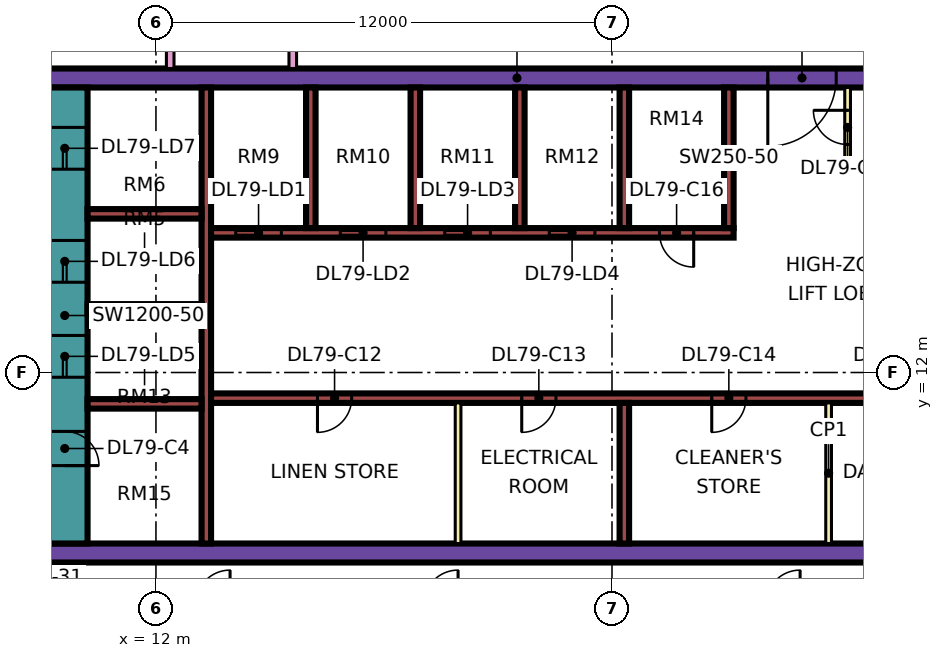
"""IFC4 building model, lengths in metres.
Left out: names, types, materials, properties, quantities, classifications, styles, units other than length and angle.
Written with IfcOpenShell. Run it as: python <this file> out.ifc"""

import sys

from ifc_helpers import new_model, si_unit, direction, frame, frame_2d, origin, place, context, subcontext, project, spatial, rectangle, extrude, element, fill, save


model = new_model("IFC4")
c1 = context("Model", 3, precision=1e-05, world=origin(), true_north=direction((0.0, 1.0)))
c2 = subcontext(c1, "Body", "Model", "MODEL_VIEW")
j1 = project(units=[si_unit("LENGTHUNIT", "METRE"), si_unit("PLANEANGLEUNIT", "RADIAN")], contexts=[c1])
p1 = place(None, origin())
s1 = spatial("IfcSite", under=j1, at=p1, CompositionType="ELEMENT")
p2 = place(p1, origin())
s2 = spatial("IfcBuilding", under=s1, at=p2, CompositionType="ELEMENT")
p3 = place(p2, frame((0.0, 0.0, 342.65)))
s3 = spatial("IfcBuildingStorey", under=s2, at=p3, CompositionType="ELEMENT", Elevation=342.65)
p4 = place(p3, frame((9.0, 7.25, 0.0), z_axis=(0.0, 0.0, 1.0), x_axis=(1.0, 0.0, 0.0)))
e1 = element("IfcWall", 1, at=p4, inside=s3, PredefinedType="SHEAR", context=c2, shape_type="SweptSolid", body=[
    extrude(rectangle(XDim=25.0, YDim=0.5, at=frame_2d((12.5, 0.0))), origin(), (0.0, 0.0, 1.0), 3.75),
])
p5 = place(p3, frame((9.0, 19.75, 0.0), z_axis=(0.0, 0.0, 1.0), x_axis=(1.0, 0.0, 0.0)))
e2 = element("IfcWall", 2, at=p5, inside=s3, PredefinedType="SHEAR", context=c2, shape_type="SweptSolid", body=[
    extrude(rectangle(XDim=25.0, YDim=0.5, at=frame_2d((12.5, 0.0))), origin(), (0.0, 0.0, 1.0), 3.75),
])
p6 = place(p5, frame((19.1, 0.0, 0.0)))
e3 = element("IfcOpeningElement", 3, at=p6, cuts=e2, PredefinedType="OPENING", context=c2, shape_type="SweptSolid", body=[
    extrude(rectangle(XDim=1.8, YDim=2.4, at=frame_2d((0.9, 1.2))), frame((0.0, 0.26, 0.0), z_axis=(0.0, -1.0, 0.0), x_axis=(1.0, 0.0, 0.0)), (0.0, 0.0, 1.0), 0.52),
])
p7 = place(p3, frame((9.6, 7.5, 0.0), z_axis=(0.0, 0.0, 1.0), x_axis=(0.0, 1.0, 0.0)))
e4 = element("IfcWall", 4, at=p7, inside=s3, PredefinedType="SHEAR", context=c2, shape_type="SweptSolid", body=[
    extrude(rectangle(XDim=12.0, YDim=1.2, at=frame_2d((6.0, 0.0))), origin(), (0.0, 0.0, 1.0), 3.75),
])
p8 = place(p7, frame((4.375, 0.0, 0.0)))
e5 = element("IfcOpeningElement", 5, at=p8, cuts=e4, PredefinedType="OPENING", context=c2, shape_type="SweptSolid", body=[
    extrude(rectangle(XDim=1.1, YDim=2.2, at=frame_2d((0.55, 1.1))), frame((0.0, 0.61, 0.0), z_axis=(0.0, -1.0, 0.0), x_axis=(1.0, 0.0, 0.0)), (0.0, 0.0, 1.0), 1.22),
])
p9 = place(p7, frame((6.875, 0.0, 0.0)))
e6 = element("IfcOpeningElement", 6, at=p9, cuts=e4, PredefinedType="OPENING", context=c2, shape_type="SweptSolid", body=[
    extrude(rectangle(XDim=1.1, YDim=2.2, at=frame_2d((0.55, 1.1))), frame((0.0, 0.61, 0.0), z_axis=(0.0, -1.0, 0.0), x_axis=(1.0, 0.0, 0.0)), (0.0, 0.0, 1.0), 1.22),
])
p10 = place(p7, frame((9.85, 0.0, 0.0)))
e7 = element("IfcOpeningElement", 7, at=p10, cuts=e4, PredefinedType="OPENING", context=c2, shape_type="SweptSolid", body=[
    extrude(rectangle(XDim=1.1, YDim=2.2, at=frame_2d((0.55, 1.1))), frame((0.0, 0.61, 0.0), z_axis=(0.0, -1.0, 0.0), x_axis=(1.0, 0.0, 0.0)), (0.0, 0.0, 1.0), 1.22),
])
p11 = place(p7, frame((2.05, 0.0, 0.0)))
e8 = element("IfcOpeningElement", 8, at=p11, cuts=e4, PredefinedType="OPENING", context=c2, shape_type="SweptSolid", body=[
    extrude(rectangle(XDim=0.9, YDim=2.1, at=frame_2d((0.45, 1.05))), frame((0.0, 0.61, 0.0), z_axis=(0.0, -1.0, 0.0), x_axis=(1.0, 0.0, 0.0)), (0.0, 0.0, 1.0), 1.22),
])
p12 = place(p3, frame((13.325, 7.5, 0.0), z_axis=(0.0, 0.0, 1.0), x_axis=(0.0, 1.0, 0.0)))
e9 = element("IfcWall", 9, at=p12, inside=s3, PredefinedType="SHEAR", context=c2, shape_type="SweptSolid", body=[
    extrude(rectangle(XDim=12.0, YDim=0.25, at=frame_2d((6.0, 0.0))), origin(), (0.0, 0.0, 1.0), 3.75),
])
p13 = place(p3, frame((13.45, 11.325, 0.0), z_axis=(0.0, 0.0, 1.0), x_axis=(1.0, 0.0, 0.0)))
e10 = element("IfcWall", 10, at=p13, inside=s3, PredefinedType="SHEAR", context=c2, shape_type="SweptSolid", body=[
    extrude(rectangle(XDim=20.05, YDim=0.25, at=frame_2d((10.025, 0.0))), origin(), (0.0, 0.0, 1.0), 3.75),
])
p14 = place(p13, frame((2.8, 0.0, 0.0)))
e11 = element("IfcOpeningElement", 11, at=p14, cuts=e10, PredefinedType="OPENING", context=c2, shape_type="SweptSolid", body=[
    extrude(rectangle(XDim=0.9, YDim=2.1, at=frame_2d((0.45, 1.05))), frame((0.0, 0.135, 0.0), z_axis=(0.0, -1.0, 0.0), x_axis=(1.0, 0.0, 0.0)), (0.0, 0.0, 1.0), 0.27),
])
p15 = place(p13, frame((8.175, 0.0, 0.0)))
e12 = element("IfcOpeningElement", 12, at=p15, cuts=e10, PredefinedType="OPENING", context=c2, shape_type="SweptSolid", body=[
    extrude(rectangle(XDim=0.9, YDim=2.1, at=frame_2d((0.45, 1.05))), frame((0.0, 0.135, 0.0), z_axis=(0.0, -1.0, 0.0), x_axis=(1.0, 0.0, 0.0)), (0.0, 0.0, 1.0), 0.27),
])
p16 = place(p13, frame((13.175, 0.0, 0.0)))
e13 = element("IfcOpeningElement", 13, at=p16, cuts=e10, PredefinedType="OPENING", context=c2, shape_type="SweptSolid", body=[
    extrude(rectangle(XDim=0.9, YDim=2.1, at=frame_2d((0.45, 1.05))), frame((0.0, 0.135, 0.0), z_axis=(0.0, -1.0, 0.0), x_axis=(1.0, 0.0, 0.0)), (0.0, 0.0, 1.0), 0.27),
])
p17 = place(p13, frame((17.7, 0.0, 0.0)))
e14 = element("IfcOpeningElement", 14, at=p17, cuts=e10, PredefinedType="OPENING", context=c2, shape_type="SweptSolid", body=[
    extrude(rectangle(XDim=0.9, YDim=2.1, at=frame_2d((0.45, 1.05))), frame((0.0, 0.135, 0.0), z_axis=(0.0, -1.0, 0.0), x_axis=(1.0, 0.0, 0.0)), (0.0, 0.0, 1.0), 0.27),
])
p18 = place(p3, frame((13.45, 15.675, 0.0), z_axis=(0.0, 0.0, 1.0), x_axis=(1.0, 0.0, 0.0)))
e15 = element("IfcWall", 15, at=p18, inside=s3, PredefinedType="SHEAR", context=c2, shape_type="SweptSolid", body=[
    extrude(rectangle(XDim=13.75, YDim=0.25, at=frame_2d((6.875, 0.0))), origin(), (0.0, 0.0, 1.0), 3.75),
])
p19 = place(p18, frame((0.65, 0.0, 0.0)))
e16 = element("IfcOpeningElement", 16, at=p19, cuts=e15, PredefinedType="OPENING", context=c2, shape_type="SweptSolid", body=[
    extrude(rectangle(XDim=1.2, YDim=2.2, at=frame_2d((0.6, 1.1))), frame((0.0, 0.135, 0.0), z_axis=(0.0, -1.0, 0.0), x_axis=(1.0, 0.0, 0.0)), (0.0, 0.0, 1.0), 0.27),
])
p20 = place(p18, frame((3.4, 0.0, 0.0)))
e17 = element("IfcOpeningElement", 17, at=p20, cuts=e15, PredefinedType="OPENING", context=c2, shape_type="SweptSolid", body=[
    extrude(rectangle(XDim=1.2, YDim=2.2, at=frame_2d((0.6, 1.1))), frame((0.0, 0.135, 0.0), z_axis=(0.0, -1.0, 0.0), x_axis=(1.0, 0.0, 0.0)), (0.0, 0.0, 1.0), 0.27),
])
p21 = place(p18, frame((6.15, 0.0, 0.0)))
e18 = element("IfcOpeningElement", 18, at=p21, cuts=e15, PredefinedType="OPENING", context=c2, shape_type="SweptSolid", body=[
    extrude(rectangle(XDim=1.2, YDim=2.2, at=frame_2d((0.6, 1.1))), frame((0.0, 0.135, 0.0), z_axis=(0.0, -1.0, 0.0), x_axis=(1.0, 0.0, 0.0)), (0.0, 0.0, 1.0), 0.27),
])
p22 = place(p18, frame((8.9, 0.0, 0.0)))
e19 = element("IfcOpeningElement", 19, at=p22, cuts=e15, PredefinedType="OPENING", context=c2, shape_type="SweptSolid", body=[
    extrude(rectangle(XDim=1.2, YDim=2.2, at=frame_2d((0.6, 1.1))), frame((0.0, 0.135, 0.0), z_axis=(0.0, -1.0, 0.0), x_axis=(1.0, 0.0, 0.0)), (0.0, 0.0, 1.0), 0.27),
])
p23 = place(p18, frame((11.8, 0.0, 0.0)))
e20 = element("IfcOpeningElement", 20, at=p23, cuts=e15, PredefinedType="OPENING", context=c2, shape_type="SweptSolid", body=[
    extrude(rectangle(XDim=0.9, YDim=2.1, at=frame_2d((0.45, 1.05))), frame((0.0, 0.135, 0.0), z_axis=(0.0, -1.0, 0.0), x_axis=(1.0, 0.0, 0.0)), (0.0, 0.0, 1.0), 0.27),
])
for number, where, z_axis, x_axis in (
    (21, (10.2, 11.175, 0.0), (0.0, 0.0, 1.0), (1.0, 0.0, 0.0)),
    (22, (10.2, 13.675, 0.0), (0.0, 0.0, 1.0), (1.0, 0.0, 0.0)),
    (23, (10.2, 16.175, 0.0), (0.0, 0.0, 1.0), (1.0, 0.0, 0.0)),
):
    element("IfcWall", number, at=place(p3, frame(where, z_axis=z_axis, x_axis=x_axis)), inside=s3, PredefinedType="SHEAR", context=c2, shape_type="SweptSolid", body=[
        extrude(rectangle(XDim=3.0, YDim=0.25, at=frame_2d((1.5, 0.0))), origin(), (0.0, 0.0, 1.0), 3.75),
    ])
for number, where, z_axis, x_axis in (
    (24, (24.325, 7.5, 0.0), (0.0, 0.0, 1.0), (0.0, 1.0, 0.0)),
    (25, (16.075, 15.8, 0.0), (0.0, 0.0, 1.0), (0.0, 1.0, 0.0)),
    (26, (18.825, 15.8, 0.0), (0.0, 0.0, 1.0), (0.0, 1.0, 0.0)),
    (27, (21.575, 15.8, 0.0), (0.0, 0.0, 1.0), (0.0, 1.0, 0.0)),
    (28, (24.325, 15.8, 0.0), (0.0, 0.0, 1.0), (0.0, 1.0, 0.0)),
    (29, (27.075, 15.8, 0.0), (0.0, 0.0, 1.0), (0.0, 1.0, 0.0)),
):
    element("IfcWall", number, at=place(p3, frame(where, z_axis=z_axis, x_axis=x_axis)), inside=s3, PredefinedType="SHEAR", context=c2, shape_type="SweptSolid", body=[
        extrude(rectangle(XDim=3.7, YDim=0.25, at=frame_2d((1.85, 0.0))), origin(), (0.0, 0.0, 1.0), 3.75),
    ])
p24 = place(p3, frame((-1.447, 12.553, 0.0), z_axis=(0.0, 0.0, 1.0), x_axis=(0.707106781187, -0.707106781187, 0.0)))
e30 = element("IfcWall", 30, at=p24, inside=s3, PredefinedType="SOLIDWALL", context=c2, shape_type="SweptSolid", body=[
    extrude(rectangle(XDim=19.799, YDim=0.15, at=frame_2d((9.899, 0.0))), origin(), (0.0, 0.0, 1.0), 3.35),
])
p25 = place(p24, frame((2.212, 0.0, 0.45)))
e31 = element("IfcOpeningElement", 31, at=p25, cuts=e30, PredefinedType="OPENING", context=c2, shape_type="SweptSolid", body=[
    extrude(rectangle(XDim=3.0, YDim=2.4, at=frame_2d((1.5, 1.2))), frame((0.0, 0.085, 0.0), z_axis=(0.0, -1.0, 0.0), x_axis=(1.0, 0.0, 0.0)), (0.0, 0.0, 1.0), 0.17),
])
p26 = place(p24, frame((10.216, 0.0, 0.45)))
e32 = element("IfcOpeningElement", 32, at=p26, cuts=e30, PredefinedType="OPENING", context=c2, shape_type="SweptSolid", body=[
    extrude(rectangle(XDim=3.0, YDim=2.4, at=frame_2d((1.5, 1.2))), frame((0.0, 0.085, 0.0), z_axis=(0.0, -1.0, 0.0), x_axis=(1.0, 0.0, 0.0)), (0.0, 0.0, 1.0), 0.17),
])
for number, where, z_axis, x_axis in (
    (33, (19.95, 7.5, 0.0), (0.0, 0.0, 1.0), (0.0, 1.0, 0.0)),
    (34, (29.7, 7.5, 0.0), (0.0, 0.0, 1.0), (0.0, 1.0, 0.0)),
):
    element("IfcWall", number, at=place(p3, frame(where, z_axis=z_axis, x_axis=x_axis)), inside=s3, PredefinedType="PARTITIONING", context=c2, shape_type="SweptSolid", body=[
        extrude(rectangle(XDim=3.7, YDim=0.15, at=frame_2d((1.85, 0.0))), origin(), (0.0, 0.0, 1.0), 3.35),
    ])
p27 = place(p3, frame((30.2, 17.5, 0.0), z_axis=(0.0, 0.0, 1.0), x_axis=(0.0, 1.0, 0.0)))
e35 = element("IfcWall", 35, at=p27, inside=s3, PredefinedType="PARTITIONING", context=c2, shape_type="SweptSolid", body=[
    extrude(rectangle(XDim=2.0, YDim=0.15, at=frame_2d((1.0, 0.0))), origin(), (0.0, 0.0, 1.0), 3.35),
])
p28 = place(p27, frame((0.5, 0.0, 0.0)))
e36 = element("IfcOpeningElement", 36, at=p28, cuts=e35, PredefinedType="OPENING", context=c2, shape_type="SweptSolid", body=[
    extrude(rectangle(XDim=0.9, YDim=2.1, at=frame_2d((0.45, 1.05))), frame((0.0, 0.085, 0.0), z_axis=(0.0, -1.0, 0.0), x_axis=(1.0, 0.0, 0.0)), (0.0, 0.0, 1.0), 0.17),
])
p29 = place(p3, frame((30.2, 17.5, 0.0), z_axis=(0.0, 0.0, 1.0), x_axis=(1.0, 0.0, 0.0)))
e37 = element("IfcWall", 37, at=p29, inside=s3, PredefinedType="PARTITIONING", context=c2, shape_type="SweptSolid", body=[
    extrude(rectangle(XDim=3.3, YDim=0.15, at=frame_2d((1.65, 0.0))), origin(), (0.0, 0.0, 1.0), 3.35),
])
p30 = place(p3, frame((12.375, 20.0, 0.0), z_axis=(0.0, 0.0, 1.0), x_axis=(0.0, 1.0, 0.0)))
e38 = element("IfcWall", 38, at=p30, inside=s3, PredefinedType="PARTITIONING", context=c2, shape_type="SweptSolid", body=[
    extrude(rectangle(XDim=34.0, YDim=0.2, at=frame_2d((17.0, 0.0))), origin(), (0.0, 0.0, 1.0), 3.35),
])
p31 = place(p30, frame((31.8, 0.0, 0.0)))
e39 = element("IfcOpeningElement", 39, at=p31, cuts=e38, PredefinedType="OPENING", context=c2, shape_type="SweptSolid", body=[
    extrude(rectangle(XDim=1.0, YDim=2.1, at=frame_2d((0.5, 1.05))), frame((0.0, 0.11, 0.0), z_axis=(0.0, -1.0, 0.0), x_axis=(1.0, 0.0, 0.0)), (0.0, 0.0, 1.0), 0.22),
])
p32 = place(p30, frame((0.6, 0.0, 0.0)))
e40 = element("IfcOpeningElement", 40, at=p32, cuts=e38, PredefinedType="OPENING", context=c2, shape_type="SweptSolid", body=[
    extrude(rectangle(XDim=1.2, YDim=2.1, at=frame_2d((0.6, 1.05))), frame((0.0, 0.11, 0.0), z_axis=(0.0, -1.0, 0.0), x_axis=(1.0, 0.0, 0.0)), (0.0, 0.0, 1.0), 0.22),
])
p33 = place(p30, frame((14.1, 0.0, 0.0)))
e41 = element("IfcOpeningElement", 41, at=p33, cuts=e38, PredefinedType="OPENING", context=c2, shape_type="SweptSolid", body=[
    extrude(rectangle(XDim=1.0, YDim=2.1, at=frame_2d((0.5, 1.05))), frame((0.0, 0.11, 0.0), z_axis=(0.0, -1.0, 0.0), x_axis=(1.0, 0.0, 0.0)), (0.0, 0.0, 1.0), 0.22),
])
p34 = place(p3, frame((15.6, 20.0, 0.0), z_axis=(0.0, 0.0, 1.0), x_axis=(0.0, 1.0, 0.0)))
e42 = element("IfcWall", 42, at=p34, inside=s3, PredefinedType="PARTITIONING", context=c2, shape_type="SweptSolid", body=[
    extrude(rectangle(XDim=27.775, YDim=0.2, at=frame_2d((13.887, 0.0))), origin(), (0.0, 0.0, 1.0), 3.35),
])
p35 = place(p34, frame((6.25, 0.0, 0.0)))
e43 = element("IfcOpeningElement", 43, at=p35, cuts=e42, PredefinedType="OPENING", context=c2, shape_type="SweptSolid", body=[
    extrude(rectangle(XDim=1.6, YDim=2.1, at=frame_2d((0.8, 1.05))), frame((0.0, 0.11, 0.0), z_axis=(0.0, -1.0, 0.0), x_axis=(1.0, 0.0, 0.0)), (0.0, 0.0, 1.0), 0.22),
])
p36 = place(p34, frame((12.55, 0.0, 0.0)))
e44 = element("IfcOpeningElement", 44, at=p36, cuts=e42, PredefinedType="OPENING", context=c2, shape_type="SweptSolid", body=[
    extrude(rectangle(XDim=1.0, YDim=2.1, at=frame_2d((0.5, 1.05))), frame((0.0, 0.11, 0.0), z_axis=(0.0, -1.0, 0.0), x_axis=(1.0, 0.0, 0.0)), (0.0, 0.0, 1.0), 0.22),
])
p37 = place(p34, frame((22.9, 0.0, 0.0)))
e45 = element("IfcOpeningElement", 45, at=p37, cuts=e42, PredefinedType="OPENING", context=c2, shape_type="SweptSolid", body=[
    extrude(rectangle(XDim=1.0, YDim=2.1, at=frame_2d((0.5, 1.05))), frame((0.0, 0.11, 0.0), z_axis=(0.0, -1.0, 0.0), x_axis=(1.0, 0.0, 0.0)), (0.0, 0.0, 1.0), 0.22),
])
p38 = place(p34, frame((1.15, 0.0, 0.0)))
e46 = element("IfcOpeningElement", 46, at=p38, cuts=e42, PredefinedType="OPENING", context=c2, shape_type="SweptSolid", body=[
    extrude(rectangle(XDim=1.8, YDim=2.1, at=frame_2d((0.9, 1.05))), frame((0.0, 0.11, 0.0), z_axis=(0.0, -1.0, 0.0), x_axis=(1.0, 0.0, 0.0)), (0.0, 0.0, 1.0), 0.22),
])
p39 = place(p34, frame((25.9, 0.0, 0.0)))
e47 = element("IfcOpeningElement", 47, at=p39, cuts=e42, PredefinedType="OPENING", context=c2, shape_type="SweptSolid", body=[
    extrude(rectangle(XDim=1.0, YDim=2.1, at=frame_2d((0.5, 1.05))), frame((0.0, 0.11, 0.0), z_axis=(0.0, -1.0, 0.0), x_axis=(1.0, 0.0, 0.0)), (0.0, 0.0, 1.0), 0.22),
])
p40 = place(p19, origin())
e48 = element("IfcDoor", 48, at=p40, inside=s3, OperationType="DOUBLE_DOOR_SLIDING", PredefinedType="DOOR", context=c2, shape_type="SweptSolid", body=[
    extrude(rectangle(XDim=1.2, YDim=2.2, at=frame_2d((0.6, 1.1))), frame((0.0, 0.025, 0.0), z_axis=(0.0, -1.0, 0.0), x_axis=(1.0, 0.0, 0.0)), (0.0, 0.0, 1.0), 0.05),
])
fill(e16, e48)
p41 = place(p20, origin())
e49 = element("IfcDoor", 49, at=p41, inside=s3, OperationType="DOUBLE_DOOR_SLIDING", PredefinedType="DOOR", context=c2, shape_type="SweptSolid", body=[
    extrude(rectangle(XDim=1.2, YDim=2.2, at=frame_2d((0.6, 1.1))), frame((0.0, 0.025, 0.0), z_axis=(0.0, -1.0, 0.0), x_axis=(1.0, 0.0, 0.0)), (0.0, 0.0, 1.0), 0.05),
])
fill(e17, e49)
p42 = place(p21, origin())
e50 = element("IfcDoor", 50, at=p42, inside=s3, OperationType="DOUBLE_DOOR_SLIDING", PredefinedType="DOOR", context=c2, shape_type="SweptSolid", body=[
    extrude(rectangle(XDim=1.2, YDim=2.2, at=frame_2d((0.6, 1.1))), frame((0.0, 0.025, 0.0), z_axis=(0.0, -1.0, 0.0), x_axis=(1.0, 0.0, 0.0)), (0.0, 0.0, 1.0), 0.05),
])
fill(e18, e50)
p43 = place(p22, origin())
e51 = element("IfcDoor", 51, at=p43, inside=s3, OperationType="DOUBLE_DOOR_SLIDING", PredefinedType="DOOR", context=c2, shape_type="SweptSolid", body=[
    extrude(rectangle(XDim=1.2, YDim=2.2, at=frame_2d((0.6, 1.1))), frame((0.0, 0.025, 0.0), z_axis=(0.0, -1.0, 0.0), x_axis=(1.0, 0.0, 0.0)), (0.0, 0.0, 1.0), 0.05),
])
fill(e19, e51)
p44 = place(p8, origin())
e52 = element("IfcDoor", 52, at=p44, inside=s3, OperationType="DOUBLE_DOOR_SLIDING", PredefinedType="DOOR", context=c2, shape_type="SweptSolid", body=[
    extrude(rectangle(XDim=1.1, YDim=2.2, at=frame_2d((0.55, 1.1))), frame((0.0, 0.025, 0.0), z_axis=(0.0, -1.0, 0.0), x_axis=(1.0, 0.0, 0.0)), (0.0, 0.0, 1.0), 0.05),
])
fill(e5, e52)
p45 = place(p9, origin())
e53 = element("IfcDoor", 53, at=p45, inside=s3, OperationType="DOUBLE_DOOR_SLIDING", PredefinedType="DOOR", context=c2, shape_type="SweptSolid", body=[
    extrude(rectangle(XDim=1.1, YDim=2.2, at=frame_2d((0.55, 1.1))), frame((0.0, 0.025, 0.0), z_axis=(0.0, -1.0, 0.0), x_axis=(1.0, 0.0, 0.0)), (0.0, 0.0, 1.0), 0.05),
])
fill(e6, e53)
p46 = place(p10, origin())
e54 = element("IfcDoor", 54, at=p46, inside=s3, OperationType="DOUBLE_DOOR_SLIDING", PredefinedType="DOOR", context=c2, shape_type="SweptSolid", body=[
    extrude(rectangle(XDim=1.1, YDim=2.2, at=frame_2d((0.55, 1.1))), frame((0.0, 0.025, 0.0), z_axis=(0.0, -1.0, 0.0), x_axis=(1.0, 0.0, 0.0)), (0.0, 0.0, 1.0), 0.05),
])
fill(e7, e54)
p47 = place(p6, frame((1.8, 0.0, 0.0), z_axis=(0.0, 0.0, 1.0), x_axis=(-1.0, 0.0, 0.0)))
e55 = element("IfcDoor", 55, at=p47, inside=s3, OperationType="DOUBLE_DOOR_SINGLE_SWING", PredefinedType="DOOR", context=c2, shape_type="SweptSolid", body=[
    extrude(rectangle(XDim=1.8, YDim=2.4, at=frame_2d((0.9, 1.2))), frame((0.0, 0.025, 0.0), z_axis=(0.0, -1.0, 0.0), x_axis=(1.0, 0.0, 0.0)), (0.0, 0.0, 1.0), 0.05),
])
fill(e3, e55)
p48 = place(p11, frame((0.9, 0.0, 0.0), z_axis=(0.0, 0.0, 1.0), x_axis=(-1.0, 0.0, 0.0)))
e56 = element("IfcDoor", 56, at=p48, inside=s3, OperationType="SINGLE_SWING_LEFT", PredefinedType="DOOR", context=c2, shape_type="SweptSolid", body=[
    extrude(rectangle(XDim=0.9, YDim=2.1, at=frame_2d((0.45, 1.05))), frame((0.0, 0.025, 0.0), z_axis=(0.0, -1.0, 0.0), x_axis=(1.0, 0.0, 0.0)), (0.0, 0.0, 1.0), 0.05),
])
fill(e8, e56)
p49 = place(p14, frame((0.9, 0.0, 0.0), z_axis=(0.0, 0.0, 1.0), x_axis=(-1.0, 0.0, 0.0)))
e57 = element("IfcDoor", 57, at=p49, inside=s3, OperationType="SINGLE_SWING_LEFT", PredefinedType="DOOR", context=c2, shape_type="SweptSolid", body=[
    extrude(rectangle(XDim=0.9, YDim=2.1, at=frame_2d((0.45, 1.05))), frame((0.0, 0.025, 0.0), z_axis=(0.0, -1.0, 0.0), x_axis=(1.0, 0.0, 0.0)), (0.0, 0.0, 1.0), 0.05),
])
fill(e11, e57)
p50 = place(p15, frame((0.9, 0.0, 0.0), z_axis=(0.0, 0.0, 1.0), x_axis=(-1.0, 0.0, 0.0)))
e58 = element("IfcDoor", 58, at=p50, inside=s3, OperationType="SINGLE_SWING_LEFT", PredefinedType="DOOR", context=c2, shape_type="SweptSolid", body=[
    extrude(rectangle(XDim=0.9, YDim=2.1, at=frame_2d((0.45, 1.05))), frame((0.0, 0.025, 0.0), z_axis=(0.0, -1.0, 0.0), x_axis=(1.0, 0.0, 0.0)), (0.0, 0.0, 1.0), 0.05),
])
fill(e12, e58)
p51 = place(p16, frame((0.9, 0.0, 0.0), z_axis=(0.0, 0.0, 1.0), x_axis=(-1.0, 0.0, 0.0)))
e59 = element("IfcDoor", 59, at=p51, inside=s3, OperationType="SINGLE_SWING_LEFT", PredefinedType="DOOR", context=c2, shape_type="SweptSolid", body=[
    extrude(rectangle(XDim=0.9, YDim=2.1, at=frame_2d((0.45, 1.05))), frame((0.0, 0.025, 0.0), z_axis=(0.0, -1.0, 0.0), x_axis=(1.0, 0.0, 0.0)), (0.0, 0.0, 1.0), 0.05),
])
fill(e13, e59)
p52 = place(p23, origin())
e60 = element("IfcDoor", 60, at=p52, inside=s3, OperationType="SINGLE_SWING_RIGHT", PredefinedType="DOOR", context=c2, shape_type="SweptSolid", body=[
    extrude(rectangle(XDim=0.9, YDim=2.1, at=frame_2d((0.45, 1.05))), frame((0.0, 0.025, 0.0), z_axis=(0.0, -1.0, 0.0), x_axis=(1.0, 0.0, 0.0)), (0.0, 0.0, 1.0), 0.05),
])
fill(e20, e60)
p53 = place(p28, frame((0.9, 0.0, 0.0), z_axis=(0.0, 0.0, 1.0), x_axis=(-1.0, 0.0, 0.0)))
e61 = element("IfcDoor", 61, at=p53, inside=s3, OperationType="SINGLE_SWING_RIGHT", PredefinedType="DOOR", context=c2, shape_type="SweptSolid", body=[
    extrude(rectangle(XDim=0.9, YDim=2.1, at=frame_2d((0.45, 1.05))), frame((0.0, 0.025, 0.0), z_axis=(0.0, -1.0, 0.0), x_axis=(1.0, 0.0, 0.0)), (0.0, 0.0, 1.0), 0.05),
])
fill(e36, e61)
save(model, sys.argv[1])
